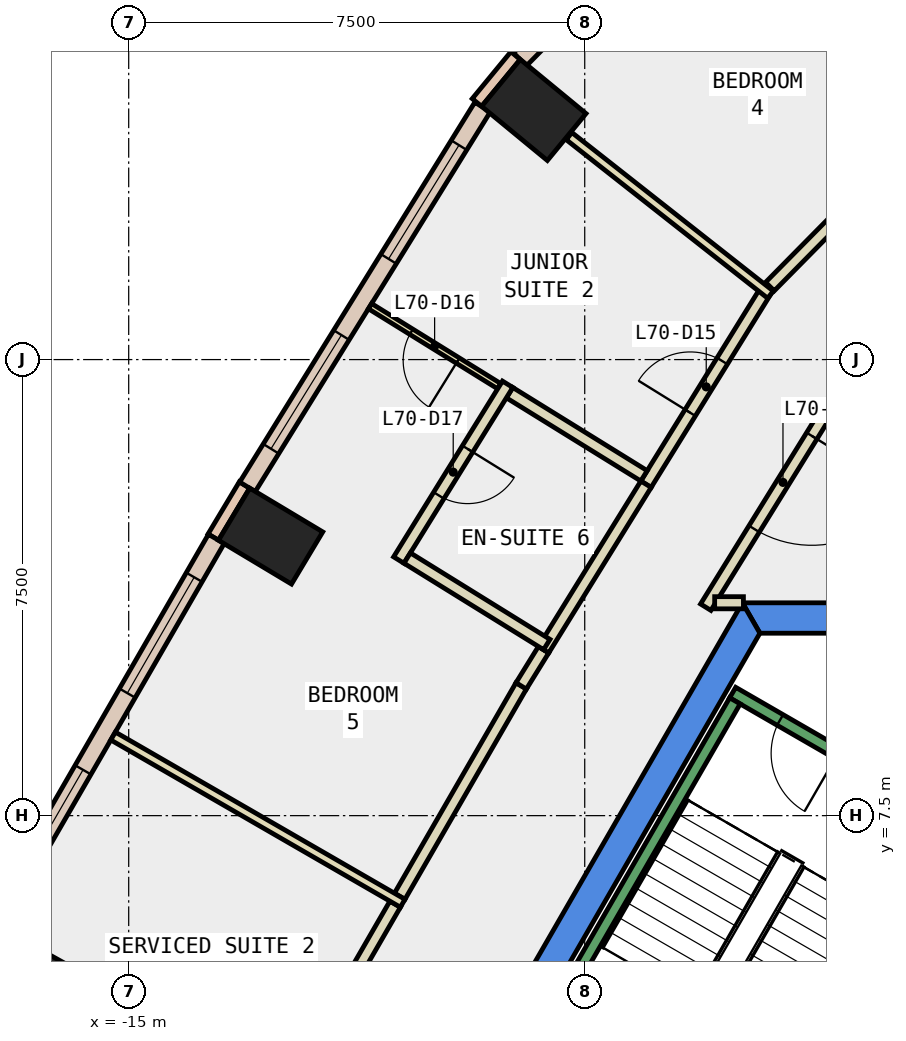
"""IFC4 building model, lengths in metres.
Left out: names, types, materials, properties, quantities, classifications, styles, units other than length and angle.
Written with IfcOpenShell. Run it as: python <this file> out.ifc"""

import sys

from ifc_helpers import new_model, si_unit, direction, frame, frame_2d, origin, origin_2d, place, context, subcontext, project, spatial, polyline, rectangle, outline, extrude, element, fill, save


model = new_model("IFC4")
c1 = context("Model", 3, precision=1e-05, world=origin(), true_north=direction((0.0, 1.0)))
c2 = subcontext(c1, "Body", "Model", "MODEL_VIEW")
j1 = project(units=[si_unit("LENGTHUNIT", "METRE"), si_unit("PLANEANGLEUNIT", "RADIAN")], contexts=[c1])
p1 = place(None, origin())
s1 = spatial("IfcSite", under=j1, at=p1, CompositionType="ELEMENT")
p2 = place(p1, origin())
s2 = spatial("IfcBuilding", under=s1, at=p2, CompositionType="ELEMENT")
p3 = place(p2, frame((0.0, 0.0, 300.8)))
s3 = spatial("IfcBuildingStorey", under=s2, at=p3, CompositionType="ELEMENT", Elevation=300.8)
for number, where, z_axis, x_axis in (
    (1, (-8.337, 19.105, -0.34), (0.0, 0.0, 1.0), (0.636, 0.772, 0.0)),
    (2, (-12.666, 12.097, -0.34), (0.0, 0.0, 1.0), (0.514, 0.858, 0.0)),
    (3, (-16.809, 4.921, -0.34), (0.0, 0.0, 1.0), (0.486, 0.874, 0.0)),
):
    element("IfcColumn", number, at=place(p3, frame(where, z_axis=z_axis, x_axis=x_axis)), inside=s3, PredefinedType="COLUMN", context=c2, shape_type="SweptSolid", body=[
        extrude(rectangle(XDim=1.0, YDim=1.4, at=origin_2d()), origin(), (0.0, 0.0, 1.0), 3.6),
    ])
p4 = place(p3, frame((0.0, 0.0, -0.34)))
e4 = element("IfcWall", 4, at=p4, inside=s3, PredefinedType="SHEAR", context=c2, shape_type="SweptSolid", body=[
    extrude(outline(polyline([(4.907, 11.0), (-4.907, 11.0), (-4.619, 10.5), (4.619, 10.5), (4.907, 11.0)])), origin(), (0.0, 0.0, 1.0), 3.6),
])
p5 = place(p3, frame((0.0, 0.0, -0.34)))
e5 = element("IfcWall", 5, at=p5, inside=s3, PredefinedType="SHEAR", context=c2, shape_type="SweptSolid", body=[
    extrude(outline(polyline([(-9.236, 3.502), (-8.803, 3.253), (-4.619, 10.5), (-4.907, 11.0), (-9.236, 3.502)])), origin(), (0.0, 0.0, 1.0), 3.6),
])
p6 = place(p3, frame((-8.637, 19.999, 0.0), z_axis=(0.0, 0.0, 1.0), x_axis=(-0.635852688617, -0.771810441999, 0.0)))
e6 = element("IfcWall", 6, at=p6, inside=s3, PredefinedType="STANDARD", context=c2, shape_type="SweptSolid", body=[
    extrude(rectangle(XDim=1.0, YDim=0.2, at=frame_2d((0.5, 0.0))), origin(), (0.0, 0.0, 1.0), 3.26),
])
p7 = place(p3, frame((-13.095, 12.938, 0.0), z_axis=(0.0, 0.0, 1.0), x_axis=(-0.513885310016, -0.857858897576, 0.0)))
e7 = element("IfcWall", 7, at=p7, inside=s3, PredefinedType="STANDARD", context=c2, shape_type="SweptSolid", body=[
    extrude(rectangle(XDim=1.0, YDim=0.2, at=frame_2d((0.5, 0.0))), origin(), (0.0, 0.0, 1.0), 3.26),
])
p8 = place(p3, frame((-5.572, 22.969, 0.0), z_axis=(0.0, 0.0, 1.0), x_axis=(-0.70250598769, -0.711677832491, 0.0)))
e8 = element("IfcWall", 8, at=p8, inside=s3, PredefinedType="STANDARD", context=c2, shape_type="SweptSolid", body=[
    extrude(rectangle(XDim=4.259, YDim=0.3, at=frame_2d((2.129, 0.0))), origin(), (0.0, 0.0, 1.0), 3.26),
])
p9 = place(p8, frame((1.429, 0.0, 0.9)))
e9 = element("IfcOpeningElement", 9, at=p9, cuts=e8, PredefinedType="OPENING", context=c2, shape_type="SweptSolid", body=[
    extrude(rectangle(XDim=1.4, YDim=2.0, at=frame_2d((0.7, 1.0))), frame((0.0, 0.16, 0.0), z_axis=(0.0, -1.0, 0.0), x_axis=(1.0, 0.0, 0.0)), (0.0, 0.0, 1.0), 0.32),
])
p10 = place(p3, frame((-9.18, 19.153, 0.0), z_axis=(0.0, 0.0, 1.0), x_axis=(-0.526409529565, -0.850231149267, 0.0)))
e10 = element("IfcWall", 10, at=p10, inside=s3, PredefinedType="STANDARD", context=c2, shape_type="SweptSolid", body=[
    extrude(rectangle(XDim=7.346, YDim=0.3, at=frame_2d((3.673, 0.0))), origin(), (0.0, 0.0, 1.0), 3.26),
])
p11 = place(p10, frame((0.737, 0.0, 0.9)))
e11 = element("IfcOpeningElement", 11, at=p11, cuts=e10, PredefinedType="OPENING", context=c2, shape_type="SweptSolid", body=[
    extrude(rectangle(XDim=2.2, YDim=2.0, at=frame_2d((1.1, 1.0))), frame((0.0, 0.16, 0.0), z_axis=(0.0, -1.0, 0.0), x_axis=(1.0, 0.0, 0.0)), (0.0, 0.0, 1.0), 0.32),
])
p12 = place(p10, frame((4.41, 0.0, 0.9)))
e12 = element("IfcOpeningElement", 12, at=p12, cuts=e10, PredefinedType="OPENING", context=c2, shape_type="SweptSolid", body=[
    extrude(rectangle(XDim=2.2, YDim=2.0, at=frame_2d((1.1, 1.0))), frame((0.0, 0.16, 0.0), z_axis=(0.0, -1.0, 0.0), x_axis=(1.0, 0.0, 0.0)), (0.0, 0.0, 1.0), 0.32),
])
p13 = place(p3, frame((-13.559, 12.051, 0.0), z_axis=(0.0, 0.0, 1.0), x_axis=(-0.499905472729, -0.866079972252, 0.0)))
e13 = element("IfcWall", 13, at=p13, inside=s3, PredefinedType="STANDARD", context=c2, shape_type="SweptSolid", body=[
    extrude(rectangle(XDim=7.313, YDim=0.3, at=frame_2d((3.657, 0.0))), origin(), (0.0, 0.0, 1.0), 3.26),
])
p14 = place(p13, frame((0.728, 0.0, 0.9)))
e14 = element("IfcOpeningElement", 14, at=p14, cuts=e13, PredefinedType="OPENING", context=c2, shape_type="SweptSolid", body=[
    extrude(rectangle(XDim=2.2, YDim=2.0, at=frame_2d((1.1, 1.0))), frame((0.0, 0.16, 0.0), z_axis=(0.0, -1.0, 0.0), x_axis=(1.0, 0.0, 0.0)), (0.0, 0.0, 1.0), 0.32),
])
p15 = place(p13, frame((4.385, 0.0, 0.9)))
e15 = element("IfcOpeningElement", 15, at=p15, cuts=e13, PredefinedType="OPENING", context=c2, shape_type="SweptSolid", body=[
    extrude(rectangle(XDim=2.2, YDim=2.0, at=frame_2d((1.1, 1.0))), frame((0.0, 0.16, 0.0), z_axis=(0.0, -1.0, 0.0), x_axis=(1.0, 0.0, 0.0)), (0.0, 0.0, 1.0), 0.32),
])
p16 = place(p3, frame((-2.969, 15.033, 0.0), z_axis=(0.0, 0.0, 1.0), x_axis=(-0.526330241425, -0.85028023437, 0.0)))
e16 = element("IfcWall", 16, at=p16, inside=s3, PredefinedType="PARTITIONING", context=c2, shape_type="SweptSolid", body=[
    extrude(rectangle(XDim=4.828, YDim=0.2, at=frame_2d((2.414, 0.0))), origin(), (0.0, 0.0, 1.0), 3.26),
])
p17 = place(p16, frame((1.514, 0.0, 0.0)))
e17 = element("IfcOpeningElement", 17, at=p17, cuts=e16, PredefinedType="OPENING", context=c2, shape_type="SweptSolid", body=[
    extrude(rectangle(XDim=1.8, YDim=2.1, at=frame_2d((0.9, 1.05))), frame((0.0, 0.11, 0.0), z_axis=(0.0, -1.0, 0.0), x_axis=(1.0, 0.0, 0.0)), (0.0, 0.0, 1.0), 0.22),
])
p18 = place(p3, frame((-5.363, 11.001, 0.0), z_axis=(0.0, 0.0, 1.0), x_axis=(1.0, 0.0, 0.0)))
e18 = element("IfcWall", 18, at=p18, inside=s3, PredefinedType="PARTITIONING", context=c2, shape_type="SweptSolid", body=[
    extrude(rectangle(XDim=0.473, YDim=0.2, at=frame_2d((0.237, 0.0))), origin(), (0.0, 0.0, 1.0), 3.26),
])
p19 = place(p3, frame((-4.454, 16.201, 0.0), z_axis=(0.0, 0.0, 1.0), x_axis=(0.702505657511, 0.711678158415, 0.0)))
e19 = element("IfcWall", 19, at=p19, inside=s3, PredefinedType="PARTITIONING", context=c2, shape_type="SweptSolid", body=[
    extrude(rectangle(XDim=3.167, YDim=0.2, at=frame_2d((1.584, 0.0))), origin(), (0.0, 0.0, 1.0), 3.26),
])
p20 = place(p3, frame((-6.493, 12.95, 0.0), z_axis=(0.0, 0.0, 1.0), x_axis=(0.526432748426, 0.850216773173, 0.0)))
e20 = element("IfcWall", 20, at=p20, inside=s3, PredefinedType="PARTITIONING", context=c2, shape_type="SweptSolid", body=[
    extrude(rectangle(XDim=3.765, YDim=0.2, at=frame_2d((1.882, 0.0))), origin(), (0.0, 0.0, 1.0), 3.26),
])
p21 = place(p20, frame((1.383, 0.0, 0.0)))
e21 = element("IfcOpeningElement", 21, at=p21, cuts=e20, PredefinedType="OPENING", context=c2, shape_type="SweptSolid", body=[
    extrude(rectangle(XDim=1.0, YDim=2.1, at=frame_2d((0.5, 1.05))), frame((0.0, 0.11, 0.0), z_axis=(0.0, -1.0, 0.0), x_axis=(1.0, 0.0, 0.0)), (0.0, 0.0, 1.0), 0.22),
])
p22 = place(p3, frame((-10.543, 6.174, 0.0), z_axis=(0.0, 0.0, 1.0), x_axis=(0.50008212199, 0.86597798544, 0.0)))
e22 = element("IfcWall", 22, at=p22, inside=s3, PredefinedType="PARTITIONING", context=c2, shape_type="SweptSolid", body=[
    extrude(rectangle(XDim=3.995, YDim=0.2, at=frame_2d((1.998, 0.0))), origin(), (0.0, 0.0, 1.0), 3.26),
])
p23 = place(p3, frame((-8.545, 9.634, 0.0), z_axis=(0.0, 0.0, 1.0), x_axis=(0.52594604986, 0.85051793199, 0.0)))
e23 = element("IfcWall", 23, at=p23, inside=s3, PredefinedType="PARTITIONING", context=c2, shape_type="SweptSolid", body=[
    extrude(rectangle(XDim=0.699, YDim=0.2, at=frame_2d((0.35, 0.0))), origin(), (0.0, 0.0, 1.0), 3.26),
])
p24 = place(p3, frame((-8.177, 10.229, 0.0), z_axis=(0.0, 0.0, 1.0), x_axis=(0.526504295939, 0.850172468595, 0.0)))
e24 = element("IfcWall", 24, at=p24, inside=s3, PredefinedType="PARTITIONING", context=c2, shape_type="SweptSolid", body=[
    extrude(rectangle(XDim=3.2, YDim=0.2, at=frame_2d((1.6, 0.0))), origin(), (0.0, 0.0, 1.0), 3.26),
])
p25 = place(p3, frame((-12.616, 2.584, 0.0), z_axis=(0.0, 0.0, 1.0), x_axis=(0.50008212199, 0.86597798544, 0.0)))
e25 = element("IfcWall", 25, at=p25, inside=s3, PredefinedType="PARTITIONING", context=c2, shape_type="SweptSolid", body=[
    extrude(rectangle(XDim=3.995, YDim=0.2, at=frame_2d((1.998, 0.0))), origin(), (0.0, 0.0, 1.0), 3.26),
])
p26 = place(p25, frame((1.498, 0.0, 0.0)))
e26 = element("IfcOpeningElement", 26, at=p26, cuts=e25, PredefinedType="OPENING", context=c2, shape_type="SweptSolid", body=[
    extrude(rectangle(XDim=1.0, YDim=2.1, at=frame_2d((0.5, 1.05))), frame((0.0, 0.11, 0.0), z_axis=(0.0, -1.0, 0.0), x_axis=(1.0, 0.0, 0.0)), (0.0, 0.0, 1.0), 0.22),
])
p27 = place(p3, frame((-4.445, 16.068, 0.0), z_axis=(0.0, 0.0, 1.0), x_axis=(-0.785872006963, 0.618389188677, 0.0)))
e27 = element("IfcWall", 27, at=p27, inside=s3, PredefinedType="PARTITIONING", context=c2, shape_type="SweptSolid", body=[
    extrude(rectangle(XDim=4.216, YDim=0.15, at=frame_2d((2.108, 0.0))), origin(), (0.0, 0.0, 1.0), 3.26),
])
p28 = place(p3, frame((-8.906, 14.562, 0.0), z_axis=(0.0, 0.0, 1.0), x_axis=(-0.850186034224, 0.526482390219, 0.0)))
e28 = element("IfcWall", 28, at=p28, inside=s3, PredefinedType="PARTITIONING", context=c2, shape_type="SweptSolid", body=[
    extrude(rectangle(XDim=2.5, YDim=0.1, at=frame_2d((1.25, 0.0))), origin(), (0.0, 0.0, 1.0), 3.26),
])
p29 = place(p28, frame((0.8, 0.0, 0.0)))
e29 = element("IfcOpeningElement", 29, at=p29, cuts=e28, PredefinedType="OPENING", context=c2, shape_type="SweptSolid", body=[
    extrude(rectangle(XDim=0.9, YDim=2.1, at=frame_2d((0.45, 1.05))), frame((0.0, 0.06, 0.0), z_axis=(0.0, -1.0, 0.0), x_axis=(1.0, 0.0, 0.0)), (0.0, 0.0, 1.0), 0.12),
])
p30 = place(p3, frame((-6.525, 13.088, 0.0), z_axis=(0.0, 0.0, 1.0), x_axis=(-0.850379182329, 0.526170358592, 0.0)))
e30 = element("IfcWall", 30, at=p30, inside=s3, PredefinedType="PARTITIONING", context=c2, shape_type="SweptSolid", body=[
    extrude(rectangle(XDim=2.6, YDim=0.2, at=frame_2d((1.3, 0.0))), origin(), (0.0, 0.0, 1.0), 3.26),
])
p31 = place(p3, frame((-8.768, 14.594, 0.0), z_axis=(0.0, 0.0, 1.0), x_axis=(-0.526418877713, -0.850225361412, 0.0)))
e31 = element("IfcWall", 31, at=p31, inside=s3, PredefinedType="PARTITIONING", context=c2, shape_type="SweptSolid", body=[
    extrude(rectangle(XDim=3.4, YDim=0.2, at=frame_2d((1.7, 0.0))), origin(), (0.0, 0.0, 1.0), 3.26),
])
p32 = place(p31, frame((1.25, 0.0, 0.0)))
e32 = element("IfcOpeningElement", 32, at=p32, cuts=e31, PredefinedType="OPENING", context=c2, shape_type="SweptSolid", body=[
    extrude(rectangle(XDim=0.9, YDim=2.1, at=frame_2d((0.45, 1.05))), frame((0.0, 0.11, 0.0), z_axis=(0.0, -1.0, 0.0), x_axis=(1.0, 0.0, 0.0)), (0.0, 0.0, 1.0), 0.22),
])
p33 = place(p3, frame((-10.42, 11.736, 0.0), z_axis=(0.0, 0.0, 1.0), x_axis=(0.850124477172, -0.52658178217, 0.0)))
e33 = element("IfcWall", 33, at=p33, inside=s3, PredefinedType="PARTITIONING", context=c2, shape_type="SweptSolid", body=[
    extrude(rectangle(XDim=2.701, YDim=0.2, at=frame_2d((1.35, 0.0))), origin(), (0.0, 0.0, 1.0), 3.26),
])
p34 = place(p3, frame((-10.494, 6.059, 0.0), z_axis=(0.0, 0.0, 1.0), x_axis=(-0.866027397988, 0.499996545922, 0.0)))
e34 = element("IfcWall", 34, at=p34, inside=s3, PredefinedType="PARTITIONING", context=c2, shape_type="SweptSolid", body=[
    extrude(rectangle(XDim=5.5, YDim=0.15, at=frame_2d((2.75, 0.0))), origin(), (0.0, 0.0, 1.0), 3.26),
])
p35 = place(p3, frame((-1.256, 7.324, 0.0), z_axis=(0.0, 0.0, 1.0), x_axis=(-0.866046073146, 0.499964197906, 0.0)))
e35 = element("IfcWall", 35, at=p35, inside=s3, PredefinedType="STANDARD", context=c2, shape_type="SweptSolid", body=[
    extrude(rectangle(XDim=4.4, YDim=0.2, at=frame_2d((2.2, 0.0))), origin(), (0.0, 0.0, 1.0), 3.26),
])
p36 = place(p35, frame((2.4, 0.0, 0.0)))
e36 = element("IfcOpeningElement", 36, at=p36, cuts=e35, PredefinedType="OPENING", context=c2, shape_type="SweptSolid", body=[
    extrude(rectangle(XDim=1.1, YDim=2.2, at=frame_2d((0.55, 1.1))), frame((0.0, 0.11, 0.0), z_axis=(0.0, -1.0, 0.0), x_axis=(1.0, 0.0, 0.0)), (0.0, 0.0, 1.0), 0.22),
])
p37 = place(p3, frame((-1.393, 7.288, 0.0), z_axis=(0.0, 0.0, 1.0), x_axis=(-0.499963383562, -0.866046543262, 0.0)))
e37 = element("IfcWall", 37, at=p37, inside=s3, PredefinedType="STANDARD", context=c2, shape_type="SweptSolid", body=[
    extrude(rectangle(XDim=6.9, YDim=0.2, at=frame_2d((3.45, 0.0))), origin(), (0.0, 0.0, 1.0), 3.26),
])
p38 = place(p37, frame((0.45, 0.0, 0.0)))
e38 = element("IfcOpeningElement", 38, at=p38, cuts=e37, PredefinedType="OPENING", context=c2, shape_type="SweptSolid", body=[
    extrude(rectangle(XDim=1.1, YDim=2.2, at=frame_2d((0.55, 1.1))), frame((0.0, 0.11, 0.0), z_axis=(0.0, -1.0, 0.0), x_axis=(1.0, 0.0, 0.0)), (0.0, 0.0, 1.0), 0.22),
])
p39 = place(p3, frame((-5.03, 9.388, 0.0), z_axis=(0.0, 0.0, 1.0), x_axis=(-0.499978703459, -0.866037698999, 0.0)))
e39 = element("IfcWall", 39, at=p39, inside=s3, PredefinedType="STANDARD", context=c2, shape_type="SweptSolid", body=[
    extrude(rectangle(XDim=6.9, YDim=0.2, at=frame_2d((3.45, 0.0))), origin(), (0.0, 0.0, 1.0), 3.26),
])
p40 = place(p11, origin())
e40 = element("IfcWindow", 40, at=p40, inside=s3, PartitioningType="SINGLE_PANEL", PredefinedType="WINDOW", context=c2, shape_type="SweptSolid", body=[
    extrude(rectangle(XDim=2.2, YDim=2.0, at=frame_2d((1.1, 1.0))), frame((0.0, 0.03, 0.0), z_axis=(0.0, -1.0, 0.0), x_axis=(1.0, 0.0, 0.0)), (0.0, 0.0, 1.0), 0.06),
])
fill(e11, e40)
p41 = place(p12, origin())
e41 = element("IfcWindow", 41, at=p41, inside=s3, PartitioningType="SINGLE_PANEL", PredefinedType="WINDOW", context=c2, shape_type="SweptSolid", body=[
    extrude(rectangle(XDim=2.2, YDim=2.0, at=frame_2d((1.1, 1.0))), frame((0.0, 0.03, 0.0), z_axis=(0.0, -1.0, 0.0), x_axis=(1.0, 0.0, 0.0)), (0.0, 0.0, 1.0), 0.06),
])
fill(e12, e41)
p42 = place(p14, origin())
e42 = element("IfcWindow", 42, at=p42, inside=s3, PartitioningType="SINGLE_PANEL", PredefinedType="WINDOW", context=c2, shape_type="SweptSolid", body=[
    extrude(rectangle(XDim=2.2, YDim=2.0, at=frame_2d((1.1, 1.0))), frame((0.0, 0.03, 0.0), z_axis=(0.0, -1.0, 0.0), x_axis=(1.0, 0.0, 0.0)), (0.0, 0.0, 1.0), 0.06),
])
fill(e14, e42)
p43 = place(p15, origin())
e43 = element("IfcWindow", 43, at=p43, inside=s3, PartitioningType="SINGLE_PANEL", PredefinedType="WINDOW", context=c2, shape_type="SweptSolid", body=[
    extrude(rectangle(XDim=2.2, YDim=2.0, at=frame_2d((1.1, 1.0))), frame((0.0, 0.03, 0.0), z_axis=(0.0, -1.0, 0.0), x_axis=(1.0, 0.0, 0.0)), (0.0, 0.0, 1.0), 0.06),
])
fill(e15, e43)
p44 = place(p21, origin())
e44 = element("IfcDoor", 44, at=p44, inside=s3, OperationType="SINGLE_SWING_LEFT", PredefinedType="DOOR", context=c2, shape_type="SweptSolid", body=[
    extrude(rectangle(XDim=1.0, YDim=2.1, at=frame_2d((0.5, 1.05))), frame((0.0, 0.025, 0.0), z_axis=(0.0, -1.0, 0.0), x_axis=(1.0, 0.0, 0.0)), (0.0, 0.0, 1.0), 0.05),
])
fill(e21, e44)
p45 = place(p29, origin())
e45 = element("IfcDoor", 45, at=p45, inside=s3, OperationType="SINGLE_SWING_LEFT", PredefinedType="DOOR", context=c2, shape_type="SweptSolid", body=[
    extrude(rectangle(XDim=0.9, YDim=2.1, at=frame_2d((0.45, 1.05))), frame((0.0, 0.025, 0.0), z_axis=(0.0, -1.0, 0.0), x_axis=(1.0, 0.0, 0.0)), (0.0, 0.0, 1.0), 0.05),
])
fill(e29, e45)
p46 = place(p32, origin())
e46 = element("IfcDoor", 46, at=p46, inside=s3, OperationType="SINGLE_SWING_LEFT", PredefinedType="DOOR", context=c2, shape_type="SweptSolid", body=[
    extrude(rectangle(XDim=0.9, YDim=2.1, at=frame_2d((0.45, 1.05))), frame((0.0, 0.025, 0.0), z_axis=(0.0, -1.0, 0.0), x_axis=(1.0, 0.0, 0.0)), (0.0, 0.0, 1.0), 0.05),
])
fill(e32, e46)
p47 = place(p17, origin())
e47 = element("IfcDoor", 47, at=p47, inside=s3, OperationType="DOUBLE_DOOR_SINGLE_SWING", PredefinedType="DOOR", context=c2, shape_type="SweptSolid", body=[
    extrude(rectangle(XDim=1.8, YDim=2.1, at=frame_2d((0.9, 1.05))), frame((0.0, 0.025, 0.0), z_axis=(0.0, -1.0, 0.0), x_axis=(1.0, 0.0, 0.0)), (0.0, 0.0, 1.0), 0.05),
])
fill(e17, e47)
p48 = place(p36, origin())
e48 = element("IfcDoor", 48, at=p48, inside=s3, OperationType="SINGLE_SWING_LEFT", PredefinedType="DOOR", context=c2, shape_type="SweptSolid", body=[
    extrude(rectangle(XDim=1.1, YDim=2.2, at=frame_2d((0.55, 1.1))), frame((0.0, 0.025, 0.0), z_axis=(0.0, -1.0, 0.0), x_axis=(1.0, 0.0, 0.0)), (0.0, 0.0, 1.0), 0.05),
])
fill(e36, e48)
save(model, sys.argv[1])
